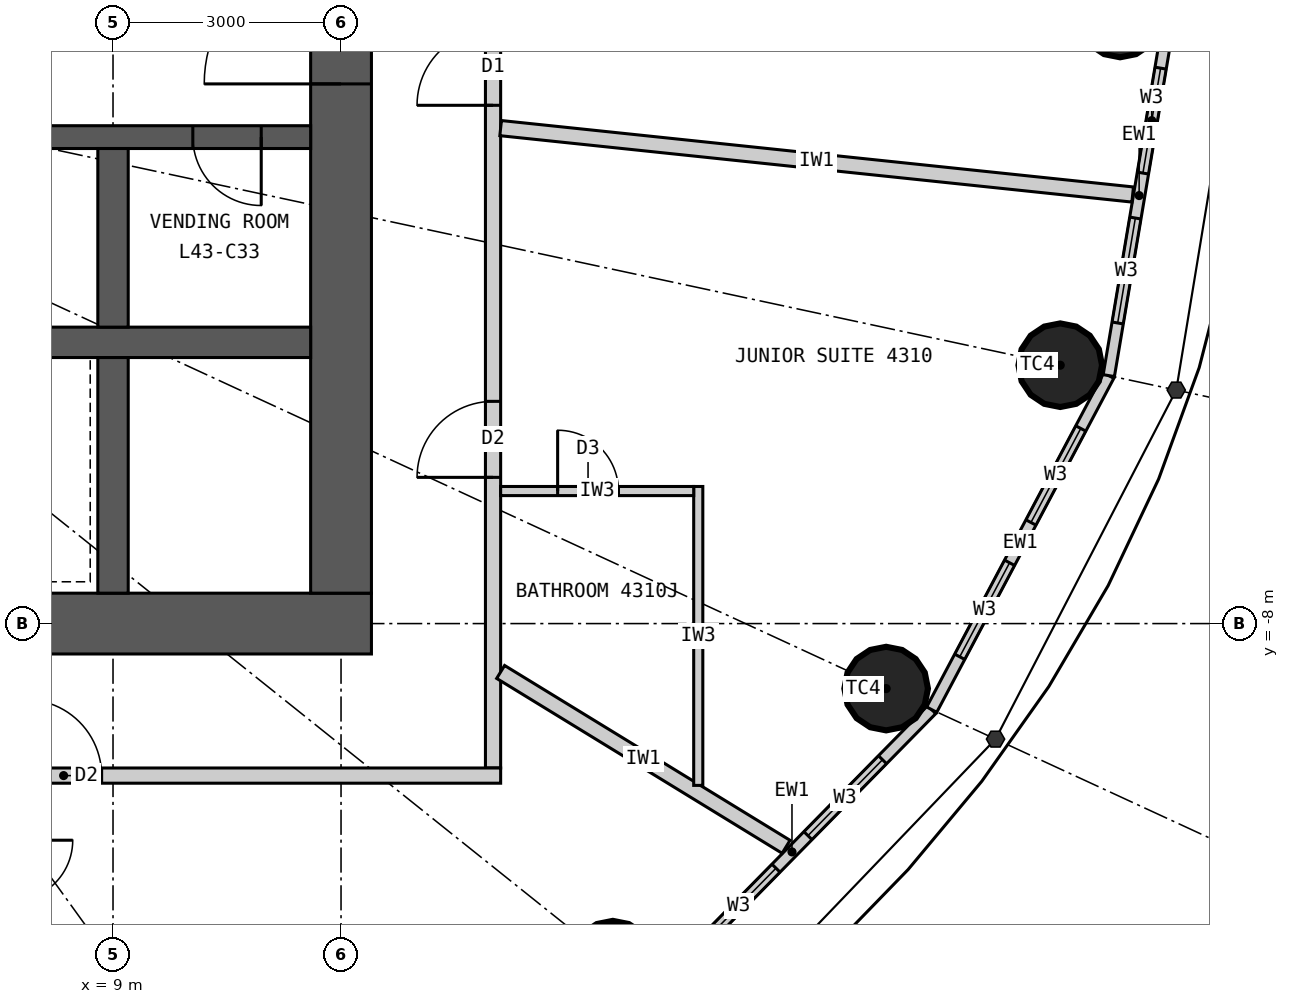
"""IFC4 building model, lengths in metres.
Left out: names, types, materials, properties, quantities, classifications, styles, units other than length and angle.
Written with IfcOpenShell. Run it as: python <this file> out.ifc"""

import sys

from ifc_helpers import new_model, si_unit, direction, frame, frame_2d, origin, origin_2d, place, context, subcontext, project, spatial, rectangle, circle, extrude, element, fill, save


model = new_model("IFC4")
c1 = context("Model", 3, precision=1e-05, world=origin(), true_north=direction((0.0, 1.0)))
c2 = subcontext(c1, "Body", "Model", "MODEL_VIEW")
j1 = project(units=[si_unit("LENGTHUNIT", "METRE"), si_unit("PLANEANGLEUNIT", "RADIAN")], contexts=[c1])
p1 = place(None, origin())
s1 = spatial("IfcSite", under=j1, at=p1, CompositionType="ELEMENT")
p2 = place(p1, origin())
s2 = spatial("IfcBuilding", under=s1, at=p2, CompositionType="ELEMENT")
p3 = place(p2, frame((0.0, 0.0, 163.2)))
s3 = spatial("IfcBuildingStorey", under=s2, at=p3, CompositionType="ELEMENT", Elevation=163.2)
for number, where, z_axis, x_axis in (
    (1, (22.25, 0.0, 0.0), (0.0, 0.0, 1.0), (1.0, 0.0, 0.0)),
    (2, (15.576, -12.461, 0.0), (0.0, 0.0, 1.0), (1.0, 0.0, 0.0)),
    (3, (19.172, -8.855, 0.0), (0.0, 0.0, 1.0), (1.0, 0.0, 0.0)),
    (4, (21.463, -4.601, 0.0), (0.0, 0.0, 1.0), (1.0, 0.0, 0.0)),
):
    element("IfcColumn", number, at=place(p3, frame(where, z_axis=z_axis, x_axis=x_axis)), inside=s3, PredefinedType="COLUMN", context=c2, shape_type="SweptSolid", body=[
        extrude(circle(Radius=0.55, at=origin_2d()), origin(), (0.0, 0.0, 1.0), 3.3),
    ])
p4 = place(p3, frame((12.4, -8.0, 0.0), z_axis=(0.0, 0.0, 1.0), x_axis=(-1.0, 0.0, 0.0)))
e5 = element("IfcWall", 5, at=p4, inside=s3, PredefinedType="SHEAR", context=c2, shape_type="SweptSolid", body=[
    extrude(rectangle(XDim=24.8, YDim=0.8, at=frame_2d((12.4, 0.0))), origin(), (0.0, 0.0, 1.0), 3.3),
])
p5 = place(p4, frame((11.1, 0.0, 0.0)))
e6 = element("IfcOpeningElement", 6, at=p5, cuts=e5, PredefinedType="OPENING", context=c2, shape_type="SweptSolid", body=[
    extrude(rectangle(XDim=1.2, YDim=2.2, at=frame_2d((0.6, 1.1))), frame((0.0, 0.41, 0.0), z_axis=(0.0, -1.0, 0.0), x_axis=(1.0, 0.0, 0.0)), (0.0, 0.0, 1.0), 0.82),
])
p6 = place(p4, frame((18.7, 0.0, 0.0)))
e7 = element("IfcOpeningElement", 7, at=p6, cuts=e5, PredefinedType="OPENING", context=c2, shape_type="SweptSolid", body=[
    extrude(rectangle(XDim=0.9, YDim=2.2, at=frame_2d((0.45, 1.1))), frame((0.0, 0.41, 0.0), z_axis=(0.0, -1.0, 0.0), x_axis=(1.0, 0.0, 0.0)), (0.0, 0.0, 1.0), 0.82),
])
p7 = place(p3, frame((12.0, -7.6, 0.0), z_axis=(0.0, 0.0, 1.0), x_axis=(0.0, 1.0, 0.0)))
e8 = element("IfcWall", 8, at=p7, inside=s3, PredefinedType="SHEAR", context=c2, shape_type="SweptSolid", body=[
    extrude(rectangle(XDim=15.2, YDim=0.8, at=frame_2d((7.6, 0.0))), origin(), (0.0, 0.0, 1.0), 3.3),
])
p8 = place(p7, frame((6.7, 0.0, 0.0)))
e9 = element("IfcOpeningElement", 9, at=p8, cuts=e8, PredefinedType="OPENING", context=c2, shape_type="SweptSolid", body=[
    extrude(rectangle(XDim=1.8, YDim=2.2, at=frame_2d((0.9, 1.1))), frame((0.0, 0.41, 0.0), z_axis=(0.0, -1.0, 0.0), x_axis=(1.0, 0.0, 0.0)), (0.0, 0.0, 1.0), 0.82),
])
p9 = place(p3, frame((-11.6, -4.3, 0.0), z_axis=(0.0, 0.0, 1.0), x_axis=(1.0, 0.0, 0.0)))
e10 = element("IfcWall", 10, at=p9, inside=s3, PredefinedType="SHEAR", context=c2, shape_type="SweptSolid", body=[
    extrude(rectangle(XDim=23.2, YDim=0.4, at=frame_2d((11.6, 0.0))), origin(), (0.0, 0.0, 1.0), 3.3),
])
p10 = place(p3, frame((-11.6, -1.6, 0.0), z_axis=(0.0, 0.0, 1.0), x_axis=(1.0, 0.0, 0.0)))
e11 = element("IfcWall", 11, at=p10, inside=s3, PredefinedType="SHEAR", context=c2, shape_type="SweptSolid", body=[
    extrude(rectangle(XDim=23.2, YDim=0.3, at=frame_2d((11.6, 0.0))), origin(), (0.0, 0.0, 1.0), 3.3),
])
p11 = place(p10, frame((9.55, 0.0, 0.0)))
e12 = element("IfcOpeningElement", 12, at=p11, cuts=e11, PredefinedType="OPENING", context=c2, shape_type="SweptSolid", body=[
    extrude(rectangle(XDim=1.1, YDim=2.2, at=frame_2d((0.55, 1.1))), frame((0.0, 0.16, 0.0), z_axis=(0.0, -1.0, 0.0), x_axis=(1.0, 0.0, 0.0)), (0.0, 0.0, 1.0), 0.32),
])
p12 = place(p10, frame((15.3, 0.0, 0.0)))
e13 = element("IfcOpeningElement", 13, at=p12, cuts=e11, PredefinedType="OPENING", context=c2, shape_type="SweptSolid", body=[
    extrude(rectangle(XDim=1.6, YDim=2.4, at=frame_2d((0.8, 1.2))), frame((0.0, 0.16, 0.0), z_axis=(0.0, -1.0, 0.0), x_axis=(1.0, 0.0, 0.0)), (0.0, 0.0, 1.0), 0.32),
])
p13 = place(p10, frame((0.65, 0.0, 0.0)))
e14 = element("IfcOpeningElement", 14, at=p13, cuts=e11, PredefinedType="OPENING", context=c2, shape_type="SweptSolid", body=[
    extrude(rectangle(XDim=0.9, YDim=2.2, at=frame_2d((0.45, 1.1))), frame((0.0, 0.16, 0.0), z_axis=(0.0, -1.0, 0.0), x_axis=(1.0, 0.0, 0.0)), (0.0, 0.0, 1.0), 0.32),
])
p14 = place(p10, frame((5.15, 0.0, 0.0)))
e15 = element("IfcOpeningElement", 15, at=p14, cuts=e11, PredefinedType="OPENING", context=c2, shape_type="SweptSolid", body=[
    extrude(rectangle(XDim=0.9, YDim=2.2, at=frame_2d((0.45, 1.1))), frame((0.0, 0.16, 0.0), z_axis=(0.0, -1.0, 0.0), x_axis=(1.0, 0.0, 0.0)), (0.0, 0.0, 1.0), 0.32),
])
p15 = place(p10, frame((21.65, 0.0, 0.0)))
e16 = element("IfcOpeningElement", 16, at=p15, cuts=e11, PredefinedType="OPENING", context=c2, shape_type="SweptSolid", body=[
    extrude(rectangle(XDim=0.9, YDim=2.2, at=frame_2d((0.45, 1.1))), frame((0.0, 0.16, 0.0), z_axis=(0.0, -1.0, 0.0), x_axis=(1.0, 0.0, 0.0)), (0.0, 0.0, 1.0), 0.32),
])
p16 = place(p3, frame((9.0, -4.1, 0.0), z_axis=(0.0, 0.0, 1.0), x_axis=(0.0, 1.0, 0.0)))
e17 = element("IfcWall", 17, at=p16, inside=s3, PredefinedType="SHEAR", context=c2, shape_type="SweptSolid", body=[
    extrude(rectangle(XDim=2.35, YDim=0.4, at=frame_2d((1.175, 0.0))), origin(), (0.0, 0.0, 1.0), 3.3),
])
p17 = place(p3, frame((9.0, -7.6, 0.0), z_axis=(0.0, 0.0, 1.0), x_axis=(0.0, 1.0, 0.0)))
e18 = element("IfcWall", 18, at=p17, inside=s3, PredefinedType="SHEAR", context=c2, shape_type="SweptSolid", body=[
    extrude(rectangle(XDim=3.1, YDim=0.4, at=frame_2d((1.55, 0.0))), origin(), (0.0, 0.0, 1.0), 3.3),
])
p18 = place(p3, frame((16.095, -12.876, 0.0), z_axis=(0.0, 0.0, 1.0), x_axis=(0.700727467776, 0.71342905457, 0.0)))
e19 = element("IfcWall", 19, at=p18, inside=s3, PredefinedType="ELEMENTEDWALL", context=c2, shape_type="SweptSolid", body=[
    extrude(rectangle(XDim=5.247, YDim=0.15, at=frame_2d((2.624, 0.0))), origin(), (0.0, 0.0, 1.0), 3.12),
])
p19 = place(p18, frame((0.924, 0.0, 0.9)))
e20 = element("IfcOpeningElement", 20, at=p19, cuts=e19, PredefinedType="OPENING", context=c2, shape_type="SweptSolid", body=[
    extrude(rectangle(XDim=1.4, YDim=1.9, at=frame_2d((0.7, 0.95))), frame((0.0, 0.085, 0.0), z_axis=(0.0, -1.0, 0.0), x_axis=(1.0, 0.0, 0.0)), (0.0, 0.0, 1.0), 0.17),
])
p20 = place(p18, frame((2.924, 0.0, 0.9)))
e21 = element("IfcOpeningElement", 21, at=p20, cuts=e19, PredefinedType="OPENING", context=c2, shape_type="SweptSolid", body=[
    extrude(rectangle(XDim=1.4, YDim=1.9, at=frame_2d((0.7, 0.95))), frame((0.0, 0.085, 0.0), z_axis=(0.0, -1.0, 0.0), x_axis=(1.0, 0.0, 0.0)), (0.0, 0.0, 1.0), 0.17),
])
p21 = place(p3, frame((19.772, -9.132, 0.0), z_axis=(0.0, 0.0, 1.0), x_axis=(0.468428906714, 0.883501193748, 0.0)))
e22 = element("IfcWall", 22, at=p21, inside=s3, PredefinedType="ELEMENTEDWALL", context=c2, shape_type="SweptSolid", body=[
    extrude(rectangle(XDim=4.974, YDim=0.15, at=frame_2d((2.487, 0.0))), origin(), (0.0, 0.0, 1.0), 3.12),
])
p22 = place(p21, frame((0.787, 0.0, 0.9)))
e23 = element("IfcOpeningElement", 23, at=p22, cuts=e22, PredefinedType="OPENING", context=c2, shape_type="SweptSolid", body=[
    extrude(rectangle(XDim=1.4, YDim=1.9, at=frame_2d((0.7, 0.95))), frame((0.0, 0.085, 0.0), z_axis=(0.0, -1.0, 0.0), x_axis=(1.0, 0.0, 0.0)), (0.0, 0.0, 1.0), 0.17),
])
p23 = place(p21, frame((2.787, 0.0, 0.9)))
e24 = element("IfcOpeningElement", 24, at=p23, cuts=e22, PredefinedType="OPENING", context=c2, shape_type="SweptSolid", body=[
    extrude(rectangle(XDim=1.4, YDim=1.9, at=frame_2d((0.7, 0.95))), frame((0.0, 0.085, 0.0), z_axis=(0.0, -1.0, 0.0), x_axis=(1.0, 0.0, 0.0)), (0.0, 0.0, 1.0), 0.17),
])
p24 = place(p3, frame((22.102, -4.738, 0.0), z_axis=(0.0, 0.0, 1.0), x_axis=(0.166162111254, 0.986098449843, 0.0)))
e25 = element("IfcWall", 25, at=p24, inside=s3, PredefinedType="ELEMENTEDWALL", context=c2, shape_type="SweptSolid", body=[
    extrude(rectangle(XDim=4.805, YDim=0.15, at=frame_2d((2.402, 0.0))), origin(), (0.0, 0.0, 1.0), 3.12),
])
p25 = place(p24, frame((0.702, 0.0, 0.9)))
e26 = element("IfcOpeningElement", 26, at=p25, cuts=e25, PredefinedType="OPENING", context=c2, shape_type="SweptSolid", body=[
    extrude(rectangle(XDim=1.4, YDim=1.9, at=frame_2d((0.7, 0.95))), frame((0.0, 0.085, 0.0), z_axis=(0.0, -1.0, 0.0), x_axis=(1.0, 0.0, 0.0)), (0.0, 0.0, 1.0), 0.17),
])
p26 = place(p24, frame((2.702, 0.0, 0.9)))
e27 = element("IfcOpeningElement", 27, at=p26, cuts=e25, PredefinedType="OPENING", context=c2, shape_type="SweptSolid", body=[
    extrude(rectangle(XDim=1.4, YDim=1.9, at=frame_2d((0.7, 0.95))), frame((0.0, 0.085, 0.0), z_axis=(0.0, -1.0, 0.0), x_axis=(1.0, 0.0, 0.0)), (0.0, 0.0, 1.0), 0.17),
])
p27 = place(p3, frame((14.0, -9.9, 0.0), z_axis=(0.0, 0.0, 1.0), x_axis=(0.0, 1.0, 0.0)))
e28 = element("IfcWall", 28, at=p27, inside=s3, PredefinedType="PARTITIONING", context=c2, shape_type="SweptSolid", body=[
    extrude(rectangle(XDim=19.8, YDim=0.2, at=frame_2d((9.9, 0.0))), origin(), (0.0, 0.0, 1.0), 3.12),
])
p28 = place(p27, frame((3.824, 0.0, 0.0)))
e29 = element("IfcOpeningElement", 29, at=p28, cuts=e28, PredefinedType="OPENING", context=c2, shape_type="SweptSolid", body=[
    extrude(rectangle(XDim=1.0, YDim=2.2, at=frame_2d((0.5, 1.1))), frame((0.0, 0.11, 0.0), z_axis=(0.0, -1.0, 0.0), x_axis=(1.0, 0.0, 0.0)), (0.0, 0.0, 1.0), 0.22),
])
p29 = place(p27, frame((8.719, 0.0, 0.0)))
e30 = element("IfcOpeningElement", 30, at=p29, cuts=e28, PredefinedType="OPENING", context=c2, shape_type="SweptSolid", body=[
    extrude(rectangle(XDim=1.0, YDim=2.2, at=frame_2d((0.5, 1.1))), frame((0.0, 0.11, 0.0), z_axis=(0.0, -1.0, 0.0), x_axis=(1.0, 0.0, 0.0)), (0.0, 0.0, 1.0), 0.22),
])
p30 = place(p27, frame((15.482, 0.0, 0.0)))
e31 = element("IfcOpeningElement", 31, at=p30, cuts=e28, PredefinedType="OPENING", context=c2, shape_type="SweptSolid", body=[
    extrude(rectangle(XDim=1.0, YDim=2.2, at=frame_2d((0.5, 1.1))), frame((0.0, 0.11, 0.0), z_axis=(0.0, -1.0, 0.0), x_axis=(1.0, 0.0, 0.0)), (0.0, 0.0, 1.0), 0.22),
])
p31 = place(p3, frame((5.24, -10.1, 0.0), z_axis=(0.0, 0.0, 1.0), x_axis=(0.460532965373, -0.887642601391, 0.0)))
e32 = element("IfcWall", 32, at=p31, inside=s3, PredefinedType="PARTITIONING", context=c2, shape_type="SweptSolid", body=[
    extrude(rectangle(XDim=7.231, YDim=0.2, at=frame_2d((3.616, 0.0))), origin(), (0.0, 0.0, 1.0), 3.12),
])
p32 = place(p3, frame((14.1, -8.636, 0.0), z_axis=(0.0, 0.0, 1.0), x_axis=(0.852731884196, -0.522348862041, 0.0)))
e33 = element("IfcWall", 33, at=p32, inside=s3, PredefinedType="PARTITIONING", context=c2, shape_type="SweptSolid", body=[
    extrude(rectangle(XDim=4.404, YDim=0.2, at=frame_2d((2.202, 0.0))), origin(), (0.0, 0.0, 1.0), 3.12),
])
p33 = place(p3, frame((14.1, -1.481, 0.0), z_axis=(0.0, 0.0, 1.0), x_axis=(0.994524794819, -0.104500873159, 0.0)))
e34 = element("IfcWall", 34, at=p33, inside=s3, PredefinedType="PARTITIONING", context=c2, shape_type="SweptSolid", body=[
    extrude(rectangle(XDim=8.362, YDim=0.2, at=frame_2d((4.181, 0.0))), origin(), (0.0, 0.0, 1.0), 2.47),
])
p34 = place(p3, frame((16.7, -10.129, 0.0), z_axis=(0.0, 0.0, 1.0), x_axis=(0.0, 1.0, 0.0)))
e35 = element("IfcWall", 35, at=p34, inside=s3, PredefinedType="PARTITIONING", context=c2, shape_type="SweptSolid", body=[
    extrude(rectangle(XDim=3.933, YDim=0.12, at=frame_2d((1.966, 0.0))), origin(), (0.0, 0.0, 1.0), 3.12),
])
p35 = place(p3, frame((14.1, -6.256, 0.0), z_axis=(0.0, 0.0, 1.0), x_axis=(1.0, 0.0, 0.0)))
e36 = element("IfcWall", 36, at=p35, inside=s3, PredefinedType="PARTITIONING", context=c2, shape_type="SweptSolid", body=[
    extrude(rectangle(XDim=2.54, YDim=0.12, at=frame_2d((1.27, 0.0))), origin(), (0.0, 0.0, 1.0), 3.12),
])
p36 = place(p35, frame((0.75, 0.0, 0.0)))
e37 = element("IfcOpeningElement", 37, at=p36, cuts=e36, PredefinedType="OPENING", context=c2, shape_type="SweptSolid", body=[
    extrude(rectangle(XDim=0.8, YDim=2.1, at=frame_2d((0.4, 1.05))), frame((0.0, 0.07, 0.0), z_axis=(0.0, -1.0, 0.0), x_axis=(1.0, 0.0, 0.0)), (0.0, 0.0, 1.0), 0.14),
])
p37 = place(p3, frame((14.1, -10.0, 0.0), z_axis=(0.0, 0.0, 1.0), x_axis=(-1.0, 0.0, 0.0)))
e38 = element("IfcWall", 38, at=p37, inside=s3, PredefinedType="PARTITIONING", context=c2, shape_type="SweptSolid", body=[
    extrude(rectangle(XDim=12.43, YDim=0.2, at=frame_2d((6.215, 0.0))), origin(), (0.0, 0.0, 1.0), 3.12),
])
p38 = place(p37, frame((5.25, 0.0, 0.0)))
e39 = element("IfcOpeningElement", 39, at=p38, cuts=e38, PredefinedType="OPENING", context=c2, shape_type="SweptSolid", body=[
    extrude(rectangle(XDim=1.0, YDim=2.2, at=frame_2d((0.5, 1.1))), frame((0.0, 0.11, 0.0), z_axis=(0.0, -1.0, 0.0), x_axis=(1.0, 0.0, 0.0)), (0.0, 0.0, 1.0), 0.22),
])
p39 = place(p19, origin())
e40 = element("IfcWindow", 40, at=p39, inside=s3, PartitioningType="SINGLE_PANEL", PredefinedType="WINDOW", context=c2, shape_type="SweptSolid", body=[
    extrude(rectangle(XDim=1.4, YDim=1.9, at=frame_2d((0.7, 0.95))), frame((0.0, 0.03, 0.0), z_axis=(0.0, -1.0, 0.0), x_axis=(1.0, 0.0, 0.0)), (0.0, 0.0, 1.0), 0.06),
])
fill(e20, e40)
p40 = place(p20, origin())
e41 = element("IfcWindow", 41, at=p40, inside=s3, PartitioningType="SINGLE_PANEL", PredefinedType="WINDOW", context=c2, shape_type="SweptSolid", body=[
    extrude(rectangle(XDim=1.4, YDim=1.9, at=frame_2d((0.7, 0.95))), frame((0.0, 0.03, 0.0), z_axis=(0.0, -1.0, 0.0), x_axis=(1.0, 0.0, 0.0)), (0.0, 0.0, 1.0), 0.06),
])
fill(e21, e41)
p41 = place(p22, origin())
e42 = element("IfcWindow", 42, at=p41, inside=s3, PartitioningType="SINGLE_PANEL", PredefinedType="WINDOW", context=c2, shape_type="SweptSolid", body=[
    extrude(rectangle(XDim=1.4, YDim=1.9, at=frame_2d((0.7, 0.95))), frame((0.0, 0.03, 0.0), z_axis=(0.0, -1.0, 0.0), x_axis=(1.0, 0.0, 0.0)), (0.0, 0.0, 1.0), 0.06),
])
fill(e23, e42)
p42 = place(p23, origin())
e43 = element("IfcWindow", 43, at=p42, inside=s3, PartitioningType="SINGLE_PANEL", PredefinedType="WINDOW", context=c2, shape_type="SweptSolid", body=[
    extrude(rectangle(XDim=1.4, YDim=1.9, at=frame_2d((0.7, 0.95))), frame((0.0, 0.03, 0.0), z_axis=(0.0, -1.0, 0.0), x_axis=(1.0, 0.0, 0.0)), (0.0, 0.0, 1.0), 0.06),
])
fill(e24, e43)
p43 = place(p25, origin())
e44 = element("IfcWindow", 44, at=p43, inside=s3, PartitioningType="SINGLE_PANEL", PredefinedType="WINDOW", context=c2, shape_type="SweptSolid", body=[
    extrude(rectangle(XDim=1.4, YDim=1.9, at=frame_2d((0.7, 0.95))), frame((0.0, 0.03, 0.0), z_axis=(0.0, -1.0, 0.0), x_axis=(1.0, 0.0, 0.0)), (0.0, 0.0, 1.0), 0.06),
])
fill(e26, e44)
p44 = place(p26, origin())
e45 = element("IfcWindow", 45, at=p44, inside=s3, PartitioningType="SINGLE_PANEL", PredefinedType="WINDOW", context=c2, shape_type="SweptSolid", body=[
    extrude(rectangle(XDim=1.4, YDim=1.9, at=frame_2d((0.7, 0.95))), frame((0.0, 0.03, 0.0), z_axis=(0.0, -1.0, 0.0), x_axis=(1.0, 0.0, 0.0)), (0.0, 0.0, 1.0), 0.06),
])
fill(e27, e45)
p45 = place(p38, origin())
e46 = element("IfcDoor", 46, at=p45, inside=s3, OperationType="SINGLE_SWING_RIGHT", PredefinedType="DOOR", context=c2, shape_type="SweptSolid", body=[
    extrude(rectangle(XDim=1.0, YDim=2.2, at=frame_2d((0.5, 1.1))), frame((0.0, 0.025, 0.0), z_axis=(0.0, -1.0, 0.0), x_axis=(1.0, 0.0, 0.0)), (0.0, 0.0, 1.0), 0.05),
])
fill(e39, e46)
p46 = place(p36, origin())
e47 = element("IfcDoor", 47, at=p46, inside=s3, OperationType="SINGLE_SWING_LEFT", PredefinedType="DOOR", context=c2, shape_type="SweptSolid", body=[
    extrude(rectangle(XDim=0.8, YDim=2.1, at=frame_2d((0.4, 1.05))), frame((0.0, 0.025, 0.0), z_axis=(0.0, -1.0, 0.0), x_axis=(1.0, 0.0, 0.0)), (0.0, 0.0, 1.0), 0.05),
])
fill(e37, e47)
p47 = place(p28, origin())
e48 = element("IfcDoor", 48, at=p47, inside=s3, OperationType="SINGLE_SWING_LEFT", PredefinedType="DOOR", context=c2, shape_type="SweptSolid", body=[
    extrude(rectangle(XDim=1.0, YDim=2.2, at=frame_2d((0.5, 1.1))), frame((0.0, 0.025, 0.0), z_axis=(0.0, -1.0, 0.0), x_axis=(1.0, 0.0, 0.0)), (0.0, 0.0, 1.0), 0.05),
])
fill(e29, e48)
p48 = place(p29, origin())
e49 = element("IfcDoor", 49, at=p48, inside=s3, OperationType="SINGLE_SWING_LEFT", PredefinedType="DOOR", context=c2, shape_type="SweptSolid", body=[
    extrude(rectangle(XDim=1.0, YDim=2.2, at=frame_2d((0.5, 1.1))), frame((0.0, 0.025, 0.0), z_axis=(0.0, -1.0, 0.0), x_axis=(1.0, 0.0, 0.0)), (0.0, 0.0, 1.0), 0.05),
])
fill(e30, e49)
p49 = place(p15, origin())
e50 = element("IfcDoor", 50, at=p49, inside=s3, OperationType="SINGLE_SWING_RIGHT", PredefinedType="DOOR", context=c2, shape_type="SweptSolid", body=[
    extrude(rectangle(XDim=0.9, YDim=2.2, at=frame_2d((0.45, 1.1))), frame((0.0, 0.025, 0.0), z_axis=(0.0, -1.0, 0.0), x_axis=(1.0, 0.0, 0.0)), (0.0, 0.0, 1.0), 0.05),
])
fill(e16, e50)
p50 = place(p8, origin())
e51 = element("IfcDoor", 51, at=p50, inside=s3, OperationType="DOUBLE_DOOR_DOUBLE_SWING", PredefinedType="DOOR", context=c2, shape_type="SweptSolid", body=[
    extrude(rectangle(XDim=1.8, YDim=2.2, at=frame_2d((0.9, 1.1))), frame((0.0, 0.025, 0.0), z_axis=(0.0, -1.0, 0.0), x_axis=(1.0, 0.0, 0.0)), (0.0, 0.0, 1.0), 0.05),
])
fill(e9, e51)
save(model, sys.argv[1])
